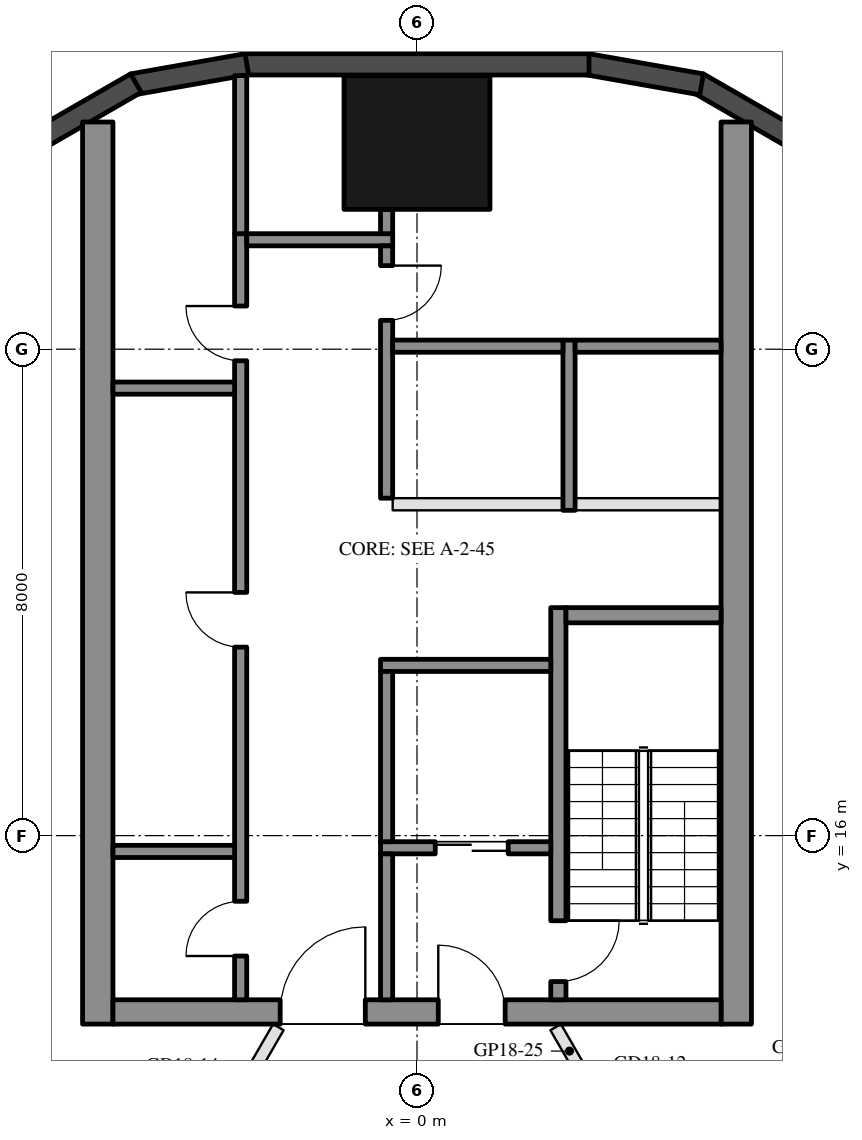
"""IFC4 building model, lengths in metres.
Left out: names, types, materials, properties, quantities, classifications, styles, units other than length and angle.
Written with IfcOpenShell. Run it as: python <this file> out.ifc"""

import sys

from ifc_helpers import new_model, si_unit, direction, frame, frame_2d, origin, origin_2d, place, context, subcontext, project, spatial, rectangle, hollow_rectangle, extrude, element, fill, save


model = new_model("IFC4")
c1 = context("Model", 3, precision=1e-05, world=origin(), true_north=direction((0.0, 1.0)))
c2 = subcontext(c1, "Body", "Model", "MODEL_VIEW")
j1 = project(units=[si_unit("LENGTHUNIT", "METRE"), si_unit("PLANEANGLEUNIT", "RADIAN")], contexts=[c1])
p1 = place(None, origin())
s1 = spatial("IfcSite", under=j1, at=p1, CompositionType="ELEMENT")
p2 = place(p1, origin())
s2 = spatial("IfcBuilding", under=s1, at=p2, CompositionType="ELEMENT")
p3 = place(p2, frame((0.0, 0.0, 198.4)))
s3 = spatial("IfcBuildingStorey", under=s2, at=p3, CompositionType="ELEMENT", Elevation=198.4)
p4 = place(p3, frame((0.0, 27.4, 0.0), z_axis=(0.0, 0.0, 1.0), x_axis=(1.0, 0.0, 0.0)))
e1 = element("IfcColumn", 1, at=p4, inside=s3, PredefinedType="COLUMN", context=c2, shape_type="SweptSolid", body=[
    extrude(hollow_rectangle(XDim=2.4, YDim=2.2, WallThickness=0.06, at=origin_2d()), origin(), (0.0, 0.0, 1.0), 3.7),
])
for number, where, z_axis, x_axis in (
    (2, (6.277, 27.422, 0.0), (0.0, 0.0, 1.0), (-0.866, 0.5, 0.0)),
    (3, (4.68, 28.356, 0.0), (0.0, 0.0, 1.0), (-0.985, 0.174, 0.0)),
):
    element("IfcWall", number, at=place(p3, frame(where, z_axis=z_axis, x_axis=x_axis)), inside=s3, PredefinedType="SOLIDWALL", context=c2, shape_type="SweptSolid", body=[
        extrude(rectangle(XDim=1.91, YDim=0.35, at=frame_2d((0.955, 0.0))), origin(), (0.0, 0.0, 1.0), 3.55),
    ])
p5 = place(p3, frame((2.829, 28.685, 0.0), z_axis=(0.0, 0.0, 1.0), x_axis=(-1.0, 0.0, 0.0)))
e4 = element("IfcWall", 4, at=p5, inside=s3, PredefinedType="SOLIDWALL", context=c2, shape_type="SweptSolid", body=[
    extrude(rectangle(XDim=5.658, YDim=0.35, at=frame_2d((2.829, 0.0))), origin(), (0.0, 0.0, 1.0), 3.55),
])
for number, where, z_axis, x_axis in (
    (5, (-2.799, 28.688, 0.0), (0.0, 0.0, 1.0), (-0.985, -0.174, 0.0)),
    (6, (-4.623, 28.377, 0.0), (0.0, 0.0, 1.0), (-0.866, -0.5, 0.0)),
):
    element("IfcWall", number, at=place(p3, frame(where, z_axis=z_axis, x_axis=x_axis)), inside=s3, PredefinedType="SOLIDWALL", context=c2, shape_type="SweptSolid", body=[
        extrude(rectangle(XDim=1.91, YDim=0.35, at=frame_2d((0.955, 0.0))), origin(), (0.0, 0.0, 1.0), 3.55),
    ])
for number, where, z_axis, x_axis in (
    (7, (5.25, 12.9, 0.0), (0.0, 0.0, 1.0), (0.0, 1.0, 0.0)),
    (8, (-5.25, 12.9, 0.0), (0.0, 0.0, 1.0), (0.0, 1.0, 0.0)),
):
    element("IfcWall", number, at=place(p3, frame(where, z_axis=z_axis, x_axis=x_axis)), inside=s3, PredefinedType="SHEAR", context=c2, shape_type="SweptSolid", body=[
        extrude(rectangle(XDim=14.837, YDim=0.5, at=frame_2d((7.418, 0.0))), origin(), (0.0, 0.0, 1.0), 3.5),
    ])
p6 = place(p3, frame((5.0, 13.1, 0.0), z_axis=(0.0, 0.0, 1.0), x_axis=(-1.0, 0.0, 0.0)))
e9 = element("IfcWall", 9, at=p6, inside=s3, PredefinedType="SHEAR", context=c2, shape_type="SweptSolid", body=[
    extrude(rectangle(XDim=10.0, YDim=0.4, at=frame_2d((5.0, 0.0))), origin(), (0.0, 0.0, 1.0), 3.5),
])
p7 = place(p6, frame((3.55, 0.0, 0.0)))
e10 = element("IfcOpeningElement", 10, at=p7, cuts=e9, PredefinedType="OPENING", context=c2, shape_type="SweptSolid", body=[
    extrude(rectangle(XDim=1.1, YDim=2.1, at=frame_2d((0.55, 1.05))), frame((0.0, 0.21, 0.0), z_axis=(0.0, -1.0, 0.0), x_axis=(1.0, 0.0, 0.0)), (0.0, 0.0, 1.0), 0.42),
])
p8 = place(p6, frame((5.85, 0.0, 0.0)))
e11 = element("IfcOpeningElement", 11, at=p8, cuts=e9, PredefinedType="OPENING", context=c2, shape_type="SweptSolid", body=[
    extrude(rectangle(XDim=1.4, YDim=2.1, at=frame_2d((0.7, 1.05))), frame((0.0, 0.21, 0.0), z_axis=(0.0, -1.0, 0.0), x_axis=(1.0, 0.0, 0.0)), (0.0, 0.0, 1.0), 0.42),
])
p9 = place(p3, frame((2.325, 13.3, 0.0), z_axis=(0.0, 0.0, 1.0), x_axis=(0.0, 1.0, 0.0)))
e12 = element("IfcWall", 12, at=p9, inside=s3, PredefinedType="SHEAR", context=c2, shape_type="SweptSolid", body=[
    extrude(rectangle(XDim=6.45, YDim=0.25, at=frame_2d((3.225, 0.0))), origin(), (0.0, 0.0, 1.0), 3.5),
])
p10 = place(p9, frame((0.3, 0.0, 0.0)))
e13 = element("IfcOpeningElement", 13, at=p10, cuts=e12, PredefinedType="OPENING", context=c2, shape_type="SweptSolid", body=[
    extrude(rectangle(XDim=1.0, YDim=2.1, at=frame_2d((0.5, 1.05))), frame((0.0, 0.135, 0.0), z_axis=(0.0, -1.0, 0.0), x_axis=(1.0, 0.0, 0.0)), (0.0, 0.0, 1.0), 0.27),
])
p11 = place(p3, frame((5.0, 19.625, 0.0), z_axis=(0.0, 0.0, 1.0), x_axis=(-1.0, 0.0, 0.0)))
e14 = element("IfcWall", 14, at=p11, inside=s3, PredefinedType="SHEAR", context=c2, shape_type="SweptSolid", body=[
    extrude(rectangle(XDim=2.55, YDim=0.25, at=frame_2d((1.275, 0.0))), origin(), (0.0, 0.0, 1.0), 3.5),
])
p12 = place(p3, frame((2.2, 18.8, 0.0), z_axis=(0.0, 0.0, 1.0), x_axis=(-1.0, 0.0, 0.0)))
e15 = element("IfcWall", 15, at=p12, inside=s3, PredefinedType="SHEAR", context=c2, shape_type="SweptSolid", body=[
    extrude(rectangle(XDim=2.8, YDim=0.2, at=frame_2d((1.4, 0.0))), origin(), (0.0, 0.0, 1.0), 3.5),
])
p13 = place(p3, frame((2.2, 15.8, 0.0), z_axis=(0.0, 0.0, 1.0), x_axis=(-1.0, 0.0, 0.0)))
e16 = element("IfcWall", 16, at=p13, inside=s3, PredefinedType="SHEAR", context=c2, shape_type="SweptSolid", body=[
    extrude(rectangle(XDim=2.8, YDim=0.2, at=frame_2d((1.4, 0.0))), origin(), (0.0, 0.0, 1.0), 3.5),
])
p14 = place(p13, frame((0.7, 0.0, 0.0)))
e17 = element("IfcOpeningElement", 17, at=p14, cuts=e16, PredefinedType="OPENING", context=c2, shape_type="SweptSolid", body=[
    extrude(rectangle(XDim=1.2, YDim=2.1, at=frame_2d((0.6, 1.05))), frame((0.0, 0.11, 0.0), z_axis=(0.0, -1.0, 0.0), x_axis=(1.0, 0.0, 0.0)), (0.0, 0.0, 1.0), 0.22),
])
p15 = place(p3, frame((-0.5, 15.9, 0.0), z_axis=(0.0, 0.0, 1.0), x_axis=(0.0, 1.0, 0.0)))
e18 = element("IfcWall", 18, at=p15, inside=s3, PredefinedType="SHEAR", context=c2, shape_type="SweptSolid", body=[
    extrude(rectangle(XDim=2.8, YDim=0.2, at=frame_2d((1.4, 0.0))), origin(), (0.0, 0.0, 1.0), 3.5),
])
p16 = place(p3, frame((-0.5, 13.3, 0.0), z_axis=(0.0, 0.0, 1.0), x_axis=(0.0, 1.0, 0.0)))
e19 = element("IfcWall", 19, at=p16, inside=s3, PredefinedType="SHEAR", context=c2, shape_type="SweptSolid", body=[
    extrude(rectangle(XDim=2.4, YDim=0.2, at=frame_2d((1.2, 0.0))), origin(), (0.0, 0.0, 1.0), 3.5),
])
p17 = place(p3, frame((-2.9, 13.3, 0.0), z_axis=(0.0, 0.0, 1.0), x_axis=(0.0, 1.0, 0.0)))
e20 = element("IfcWall", 20, at=p17, inside=s3, PredefinedType="SHEAR", context=c2, shape_type="SweptSolid", body=[
    extrude(rectangle(XDim=12.6, YDim=0.2, at=frame_2d((6.3, 0.0))), origin(), (0.0, 0.0, 1.0), 3.5),
])
p18 = place(p17, frame((0.72, 0.0, 0.0)))
e21 = element("IfcOpeningElement", 21, at=p18, cuts=e20, PredefinedType="OPENING", context=c2, shape_type="SweptSolid", body=[
    extrude(rectangle(XDim=0.9, YDim=2.1, at=frame_2d((0.45, 1.05))), frame((0.0, 0.11, 0.0), z_axis=(0.0, -1.0, 0.0), x_axis=(1.0, 0.0, 0.0)), (0.0, 0.0, 1.0), 0.22),
])
p19 = place(p17, frame((5.8, 0.0, 0.0)))
e22 = element("IfcOpeningElement", 22, at=p19, cuts=e20, PredefinedType="OPENING", context=c2, shape_type="SweptSolid", body=[
    extrude(rectangle(XDim=0.9, YDim=2.1, at=frame_2d((0.45, 1.05))), frame((0.0, 0.11, 0.0), z_axis=(0.0, -1.0, 0.0), x_axis=(1.0, 0.0, 0.0)), (0.0, 0.0, 1.0), 0.22),
])
p20 = place(p17, frame((10.51, 0.0, 0.0)))
e23 = element("IfcOpeningElement", 23, at=p20, cuts=e20, PredefinedType="OPENING", context=c2, shape_type="SweptSolid", body=[
    extrude(rectangle(XDim=0.9, YDim=2.1, at=frame_2d((0.45, 1.05))), frame((0.0, 0.11, 0.0), z_axis=(0.0, -1.0, 0.0), x_axis=(1.0, 0.0, 0.0)), (0.0, 0.0, 1.0), 0.22),
])
p21 = place(p3, frame((-0.4, 25.8, 0.0), z_axis=(0.0, 0.0, 1.0), x_axis=(-1.0, 0.0, 0.0)))
e24 = element("IfcWall", 24, at=p21, inside=s3, PredefinedType="SHEAR", context=c2, shape_type="SweptSolid", body=[
    extrude(rectangle(XDim=2.4, YDim=0.2, at=frame_2d((1.2, 0.0))), origin(), (0.0, 0.0, 1.0), 3.5),
])
p22 = place(p3, frame((-0.5, 21.55, 0.0), z_axis=(0.0, 0.0, 1.0), x_axis=(0.0, 1.0, 0.0)))
e25 = element("IfcWall", 25, at=p22, inside=s3, PredefinedType="SHEAR", context=c2, shape_type="SweptSolid", body=[
    extrude(rectangle(XDim=4.15, YDim=0.2, at=frame_2d((2.075, 0.0))), origin(), (0.0, 0.0, 1.0), 3.5),
])
p23 = place(p22, frame((2.925, 0.0, 0.0)))
e26 = element("IfcOpeningElement", 26, at=p23, cuts=e25, PredefinedType="OPENING", context=c2, shape_type="SweptSolid", body=[
    extrude(rectangle(XDim=0.9, YDim=2.1, at=frame_2d((0.45, 1.05))), frame((0.0, 0.11, 0.0), z_axis=(0.0, -1.0, 0.0), x_axis=(1.0, 0.0, 0.0)), (0.0, 0.0, 1.0), 0.22),
])
for number, where, z_axis, x_axis in (
    (27, (-3.0, 15.74, 0.0), (0.0, 0.0, 1.0), (-1.0, 0.0, 0.0)),
    (28, (-3.0, 23.36, 0.0), (0.0, 0.0, 1.0), (-1.0, 0.0, 0.0)),
):
    element("IfcWall", number, at=place(p3, frame(where, z_axis=z_axis, x_axis=x_axis)), inside=s3, PredefinedType="SHEAR", context=c2, shape_type="SweptSolid", body=[
        extrude(rectangle(XDim=2.0, YDim=0.2, at=frame_2d((1.0, 0.0))), origin(), (0.0, 0.0, 1.0), 3.5),
    ])
p24 = place(p3, frame((-0.5, 25.9, 0.0), z_axis=(0.0, 0.0, 1.0), x_axis=(0.0, 1.0, 0.0)))
e29 = element("IfcWall", 29, at=p24, inside=s3, PredefinedType="SHEAR", context=c2, shape_type="SweptSolid", body=[
    extrude(rectangle(XDim=0.4, YDim=0.2, at=frame_2d((0.2, 0.0))), origin(), (0.0, 0.0, 1.0), 3.5),
])
p25 = place(p3, frame((-2.9, 25.9, 0.0), z_axis=(0.0, 0.0, 1.0), x_axis=(0.0, 1.0, 0.0)))
e30 = element("IfcWall", 30, at=p25, inside=s3, PredefinedType="SHEAR", context=c2, shape_type="SweptSolid", body=[
    extrude(rectangle(XDim=2.6, YDim=0.2, at=frame_2d((1.3, 0.0))), origin(), (0.0, 0.0, 1.0), 3.5),
])
p26 = place(p3, frame((2.5, 21.35, 0.0), z_axis=(0.0, 0.0, 1.0), x_axis=(0.0, 1.0, 0.0)))
e31 = element("IfcWall", 31, at=p26, inside=s3, PredefinedType="SHEAR", context=c2, shape_type="SweptSolid", body=[
    extrude(rectangle(XDim=2.8, YDim=0.2, at=frame_2d((1.4, 0.0))), origin(), (0.0, 0.0, 1.0), 3.5),
])
p27 = place(p3, frame((5.0, 24.05, 0.0), z_axis=(0.0, 0.0, 1.0), x_axis=(-1.0, 0.0, 0.0)))
e32 = element("IfcWall", 32, at=p27, inside=s3, PredefinedType="SHEAR", context=c2, shape_type="SweptSolid", body=[
    extrude(rectangle(XDim=2.4, YDim=0.2, at=frame_2d((1.2, 0.0))), origin(), (0.0, 0.0, 1.0), 3.5),
])
p28 = place(p3, frame((2.4, 24.05, 0.0), z_axis=(0.0, 0.0, 1.0), x_axis=(-1.0, 0.0, 0.0)))
e33 = element("IfcWall", 33, at=p28, inside=s3, PredefinedType="SHEAR", context=c2, shape_type="SweptSolid", body=[
    extrude(rectangle(XDim=2.8, YDim=0.2, at=frame_2d((1.4, 0.0))), origin(), (0.0, 0.0, 1.0), 3.5),
])
p29 = place(p3, frame((5.0, 21.45, 0.0), z_axis=(0.0, 0.0, 1.0), x_axis=(-1.0, 0.0, 0.0)))
e34 = element("IfcWall", 34, at=p29, inside=s3, PredefinedType="PARTITIONING", context=c2, shape_type="SweptSolid", body=[
    extrude(rectangle(XDim=2.4, YDim=0.2, at=frame_2d((1.2, 0.0))), origin(), (0.0, 0.0, 1.0), 3.5),
])
p30 = place(p3, frame((2.4, 21.45, 0.0), z_axis=(0.0, 0.0, 1.0), x_axis=(-1.0, 0.0, 0.0)))
e35 = element("IfcWall", 35, at=p30, inside=s3, PredefinedType="PARTITIONING", context=c2, shape_type="SweptSolid", body=[
    extrude(rectangle(XDim=2.8, YDim=0.2, at=frame_2d((1.4, 0.0))), origin(), (0.0, 0.0, 1.0), 3.5),
])
p31 = place(p3, frame((13.647, 14.923, 0.0), z_axis=(0.0, 0.0, 1.0), x_axis=(-0.866027479907, -0.499996404033, 0.0)))
e36 = element("IfcWall", 36, at=p31, inside=s3, PredefinedType="PARTITIONING", context=c2, shape_type="SweptSolid", body=[
    extrude(rectangle(XDim=10.98, YDim=0.2, at=frame_2d((5.49, 0.0))), origin(), (0.0, 0.0, 1.0), 3.06),
])
p32 = place(p3, frame((-13.192, 13.91, 0.0), z_axis=(0.0, 0.0, 1.0), x_axis=(0.892469554868, -0.451107629766, 0.0)))
e37 = element("IfcWall", 37, at=p32, inside=s3, PredefinedType="PARTITIONING", context=c2, shape_type="SweptSolid", body=[
    extrude(rectangle(XDim=10.096, YDim=0.2, at=frame_2d((5.048, 0.0))), origin(), (0.0, 0.0, 1.0), 3.06),
])
p33 = place(p3, frame((2.281, 12.85, 0.0), z_axis=(0.0, 0.0, 1.0), x_axis=(0.499979074716, -0.866037484666, 0.0)))
e38 = element("IfcWall", 38, at=p33, inside=s3, PredefinedType="PARTITIONING", context=c2, shape_type="SweptSolid", body=[
    extrude(rectangle(XDim=3.788, YDim=0.2, at=frame_2d((1.894, 0.0))), origin(), (0.0, 0.0, 1.0), 2.95),
])
p34 = place(p33, frame((1.394, 0.0, 0.0)))
e39 = element("IfcOpeningElement", 39, at=p34, cuts=e38, PredefinedType="OPENING", context=c2, shape_type="SweptSolid", body=[
    extrude(rectangle(XDim=1.0, YDim=2.1, at=frame_2d((0.5, 1.05))), frame((0.0, 0.11, 0.0), z_axis=(0.0, -1.0, 0.0), x_axis=(1.0, 0.0, 0.0)), (0.0, 0.0, 1.0), 0.22),
])
p35 = place(p3, frame((-4.222, 9.488, 0.0), z_axis=(0.0, 0.0, 1.0), x_axis=(0.49998736472, 0.866032698644, 0.0)))
e40 = element("IfcWall", 40, at=p35, inside=s3, PredefinedType="PARTITIONING", context=c2, shape_type="SweptSolid", body=[
    extrude(rectangle(XDim=3.882, YDim=0.2, at=frame_2d((1.941, 0.0))), origin(), (0.0, 0.0, 1.0), 2.95),
])
p36 = place(p35, frame((1.441, 0.0, 0.0)))
e41 = element("IfcOpeningElement", 41, at=p36, cuts=e40, PredefinedType="OPENING", context=c2, shape_type="SweptSolid", body=[
    extrude(rectangle(XDim=1.0, YDim=2.1, at=frame_2d((0.5, 1.05))), frame((0.0, 0.11, 0.0), z_axis=(0.0, -1.0, 0.0), x_axis=(1.0, 0.0, 0.0)), (0.0, 0.0, 1.0), 0.22),
])
p37 = place(p14, origin())
e42 = element("IfcDoor", 42, at=p37, inside=s3, OperationType="DOUBLE_DOOR_SLIDING", PredefinedType="DOOR", context=c2, shape_type="SweptSolid", body=[
    extrude(rectangle(XDim=1.2, YDim=2.1, at=frame_2d((0.6, 1.05))), frame((0.0, 0.025, 0.0), z_axis=(0.0, -1.0, 0.0), x_axis=(1.0, 0.0, 0.0)), (0.0, 0.0, 1.0), 0.05),
])
fill(e17, e42)
p38 = place(p18, origin())
e43 = element("IfcDoor", 43, at=p38, inside=s3, OperationType="SINGLE_SWING_LEFT", PredefinedType="DOOR", context=c2, shape_type="SweptSolid", body=[
    extrude(rectangle(XDim=0.9, YDim=2.1, at=frame_2d((0.45, 1.05))), frame((0.0, 0.025, 0.0), z_axis=(0.0, -1.0, 0.0), x_axis=(1.0, 0.0, 0.0)), (0.0, 0.0, 1.0), 0.05),
])
fill(e21, e43)
p39 = place(p19, origin())
e44 = element("IfcDoor", 44, at=p39, inside=s3, OperationType="SINGLE_SWING_RIGHT", PredefinedType="DOOR", context=c2, shape_type="SweptSolid", body=[
    extrude(rectangle(XDim=0.9, YDim=2.1, at=frame_2d((0.45, 1.05))), frame((0.0, 0.025, 0.0), z_axis=(0.0, -1.0, 0.0), x_axis=(1.0, 0.0, 0.0)), (0.0, 0.0, 1.0), 0.05),
])
fill(e22, e44)
p40 = place(p20, origin())
e45 = element("IfcDoor", 45, at=p40, inside=s3, OperationType="SINGLE_SWING_RIGHT", PredefinedType="DOOR", context=c2, shape_type="SweptSolid", body=[
    extrude(rectangle(XDim=0.9, YDim=2.1, at=frame_2d((0.45, 1.05))), frame((0.0, 0.025, 0.0), z_axis=(0.0, -1.0, 0.0), x_axis=(1.0, 0.0, 0.0)), (0.0, 0.0, 1.0), 0.05),
])
fill(e23, e45)
p41 = place(p23, frame((0.9, 0.0, 0.0), z_axis=(0.0, 0.0, 1.0), x_axis=(-1.0, 0.0, 0.0)))
e46 = element("IfcDoor", 46, at=p41, inside=s3, OperationType="SINGLE_SWING_LEFT", PredefinedType="DOOR", context=c2, shape_type="SweptSolid", body=[
    extrude(rectangle(XDim=0.9, YDim=2.1, at=frame_2d((0.45, 1.05))), frame((0.0, 0.025, 0.0), z_axis=(0.0, -1.0, 0.0), x_axis=(1.0, 0.0, 0.0)), (0.0, 0.0, 1.0), 0.05),
])
fill(e26, e46)
p42 = place(p7, frame((1.1, 0.0, 0.0), z_axis=(0.0, 0.0, 1.0), x_axis=(-1.0, 0.0, 0.0)))
e47 = element("IfcDoor", 47, at=p42, inside=s3, OperationType="SINGLE_SWING_LEFT", PredefinedType="DOOR", context=c2, shape_type="SweptSolid", body=[
    extrude(rectangle(XDim=1.1, YDim=2.1, at=frame_2d((0.55, 1.05))), frame((0.0, 0.025, 0.0), z_axis=(0.0, -1.0, 0.0), x_axis=(1.0, 0.0, 0.0)), (0.0, 0.0, 1.0), 0.05),
])
fill(e10, e47)
p43 = place(p8, frame((1.4, 0.0, 0.0), z_axis=(0.0, 0.0, 1.0), x_axis=(-1.0, 0.0, 0.0)))
e48 = element("IfcDoor", 48, at=p43, inside=s3, OperationType="DOUBLE_DOOR_SINGLE_SWING", PredefinedType="DOOR", context=c2, shape_type="SweptSolid", body=[
    extrude(rectangle(XDim=1.4, YDim=2.1, at=frame_2d((0.7, 1.05))), frame((0.0, 0.025, 0.0), z_axis=(0.0, -1.0, 0.0), x_axis=(1.0, 0.0, 0.0)), (0.0, 0.0, 1.0), 0.05),
])
fill(e11, e48)
p44 = place(p10, frame((1.0, 0.0, 0.0), z_axis=(0.0, 0.0, 1.0), x_axis=(-1.0, 0.0, 0.0)))
e49 = element("IfcDoor", 49, at=p44, inside=s3, OperationType="SINGLE_SWING_LEFT", PredefinedType="DOOR", context=c2, shape_type="SweptSolid", body=[
    extrude(rectangle(XDim=1.0, YDim=2.1, at=frame_2d((0.5, 1.05))), frame((0.0, 0.025, 0.0), z_axis=(0.0, -1.0, 0.0), x_axis=(1.0, 0.0, 0.0)), (0.0, 0.0, 1.0), 0.05),
])
fill(e13, e49)
save(model, sys.argv[1])
